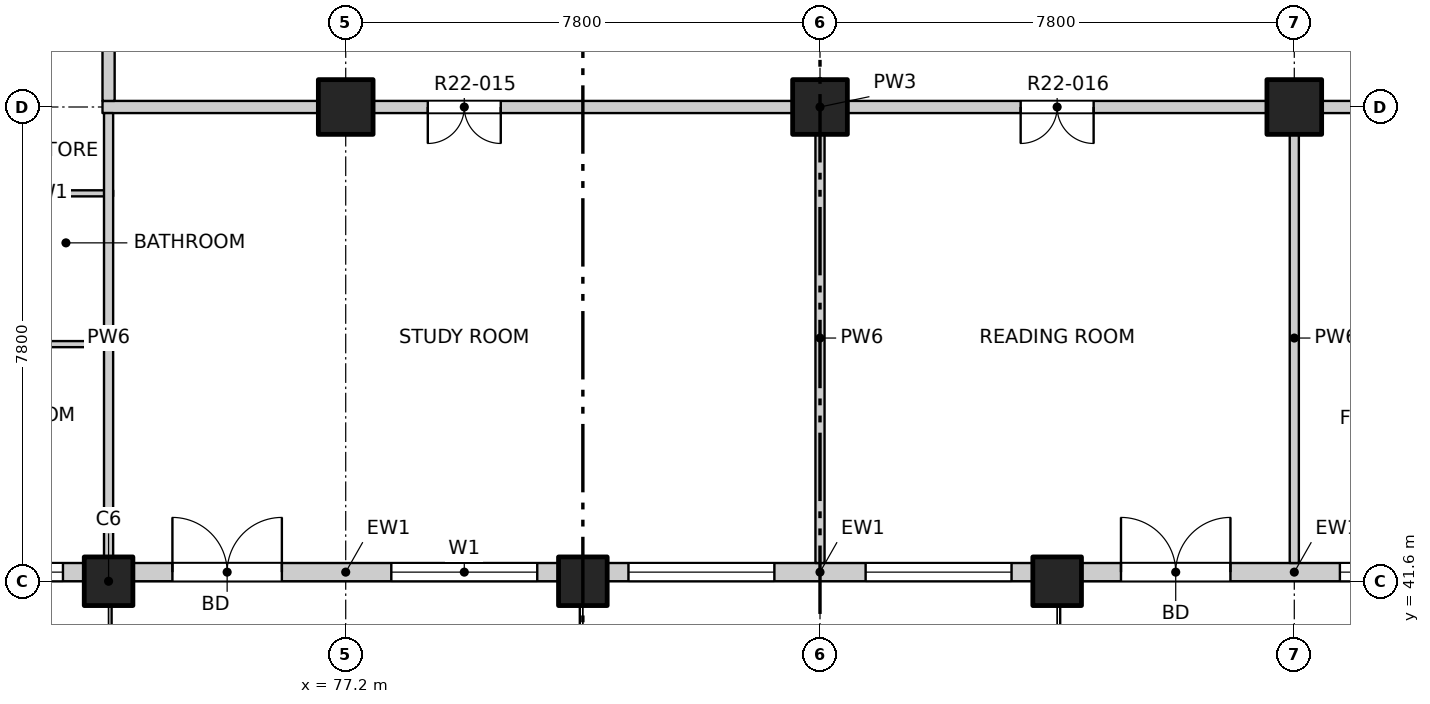
"""IFC4 building model, lengths in metres.
Left out: names, types, materials, properties, quantities, classifications, styles, units other than length and angle.
Written with IfcOpenShell. Run it as: python <this file> out.ifc"""

import sys

from ifc_helpers import new_model, si_unit, direction, frame, frame_2d, origin, origin_2d, place, context, subcontext, project, spatial, rectangle, extrude, element, fill, save


model = new_model("IFC4")
c1 = context("Model", 3, precision=1e-05, world=origin(), true_north=direction((0.0, 1.0)))
c2 = subcontext(c1, "Body", "Model", "MODEL_VIEW")
j1 = project(units=[si_unit("LENGTHUNIT", "METRE"), si_unit("PLANEANGLEUNIT", "RADIAN")], contexts=[c1])
p1 = place(None, origin())
s1 = spatial("IfcSite", under=j1, at=p1, CompositionType="ELEMENT")
p2 = place(p1, origin())
s2 = spatial("IfcBuilding", under=s1, at=p2, CompositionType="ELEMENT")
p3 = place(p2, frame((0.0, 0.0, 224.5)))
s3 = spatial("IfcBuildingStorey", under=s2, at=p3, CompositionType="ELEMENT", Elevation=224.5)
for number, where, z_axis, x_axis in (
    (1, (73.3, 41.6, -0.25), (0.0, 0.0, 1.0), (1.0, 0.0, 0.0)),
    (2, (81.1, 41.6, -0.25), (0.0, 0.0, 1.0), (1.0, 0.0, 0.0)),
    (3, (88.9, 41.6, -0.25), (0.0, 0.0, 1.0), (1.0, 0.0, 0.0)),
):
    element("IfcColumn", number, at=place(p3, frame(where, z_axis=z_axis, x_axis=x_axis)), inside=s3, PredefinedType="COLUMN", context=c2, shape_type="SweptSolid", body=[
        extrude(rectangle(XDim=0.8, YDim=0.8, at=origin_2d()), origin(), (0.0, 0.0, 1.0), 3.4),
    ])
for number, where, z_axis, x_axis in (
    (4, (77.2, 49.4, -0.25), (0.0, 0.0, 1.0), (1.0, 0.0, 0.0)),
    (5, (85.0, 49.4, -0.25), (0.0, 0.0, 1.0), (1.0, 0.0, 0.0)),
    (6, (92.8, 49.4, -0.25), (0.0, 0.0, 1.0), (1.0, 0.0, 0.0)),
):
    element("IfcColumn", number, at=place(p3, frame(where, z_axis=z_axis, x_axis=x_axis)), inside=s3, PredefinedType="COLUMN", context=c2, shape_type="SweptSolid", body=[
        extrude(rectangle(XDim=0.9, YDim=0.9, at=origin_2d()), origin(), (0.0, 0.0, 1.0), 3.4),
    ])
p4 = place(p3, frame((65.5, 41.75, 0.0), z_axis=(0.0, 0.0, 1.0), x_axis=(1.0, 0.0, 0.0)))
e7 = element("IfcWall", 7, at=p4, inside=s3, PredefinedType="SOLIDWALL", context=c2, shape_type="SweptSolid", body=[
    extrude(rectangle(XDim=7.4, YDim=0.3, at=frame_2d((3.7, 0.0))), origin(), (0.0, 0.0, 1.0), 2.7),
])
p5 = place(p4, frame((0.75, 0.0, 0.9)))
e8 = element("IfcOpeningElement", 8, at=p5, cuts=e7, PredefinedType="OPENING", context=c2, shape_type="SweptSolid", body=[
    extrude(rectangle(XDim=2.4, YDim=1.8, at=frame_2d((1.2, 0.9))), frame((0.0, 0.16, 0.0), z_axis=(0.0, -1.0, 0.0), x_axis=(1.0, 0.0, 0.0)), (0.0, 0.0, 1.0), 0.32),
])
p6 = place(p4, frame((4.65, 0.0, 0.9)))
e9 = element("IfcOpeningElement", 9, at=p6, cuts=e7, PredefinedType="OPENING", context=c2, shape_type="SweptSolid", body=[
    extrude(rectangle(XDim=2.4, YDim=1.8, at=frame_2d((1.2, 0.9))), frame((0.0, 0.16, 0.0), z_axis=(0.0, -1.0, 0.0), x_axis=(1.0, 0.0, 0.0)), (0.0, 0.0, 1.0), 0.32),
])
p7 = place(p3, frame((73.7, 41.75, 0.0), z_axis=(0.0, 0.0, 1.0), x_axis=(1.0, 0.0, 0.0)))
e10 = element("IfcWall", 10, at=p7, inside=s3, PredefinedType="SOLIDWALL", context=c2, shape_type="SweptSolid", body=[
    extrude(rectangle(XDim=7.0, YDim=0.3, at=frame_2d((3.5, 0.0))), origin(), (0.0, 0.0, 1.0), 2.7),
])
p8 = place(p7, frame((0.65, 0.0, 0.0)))
e11 = element("IfcOpeningElement", 11, at=p8, cuts=e10, PredefinedType="OPENING", context=c2, shape_type="SweptSolid", body=[
    extrude(rectangle(XDim=1.8, YDim=2.4, at=frame_2d((0.9, 1.2))), frame((0.0, 0.16, 0.0), z_axis=(0.0, -1.0, 0.0), x_axis=(1.0, 0.0, 0.0)), (0.0, 0.0, 1.0), 0.32),
])
p9 = place(p7, frame((4.25, 0.0, 0.9)))
e12 = element("IfcOpeningElement", 12, at=p9, cuts=e10, PredefinedType="OPENING", context=c2, shape_type="SweptSolid", body=[
    extrude(rectangle(XDim=2.4, YDim=1.8, at=frame_2d((1.2, 0.9))), frame((0.0, 0.16, 0.0), z_axis=(0.0, -1.0, 0.0), x_axis=(1.0, 0.0, 0.0)), (0.0, 0.0, 1.0), 0.32),
])
p10 = place(p3, frame((81.5, 41.75, 0.0), z_axis=(0.0, 0.0, 1.0), x_axis=(1.0, 0.0, 0.0)))
e13 = element("IfcWall", 13, at=p10, inside=s3, PredefinedType="SOLIDWALL", context=c2, shape_type="SweptSolid", body=[
    extrude(rectangle(XDim=7.0, YDim=0.3, at=frame_2d((3.5, 0.0))), origin(), (0.0, 0.0, 1.0), 2.7),
])
p11 = place(p10, frame((0.35, 0.0, 0.9)))
e14 = element("IfcOpeningElement", 14, at=p11, cuts=e13, PredefinedType="OPENING", context=c2, shape_type="SweptSolid", body=[
    extrude(rectangle(XDim=2.4, YDim=1.8, at=frame_2d((1.2, 0.9))), frame((0.0, 0.16, 0.0), z_axis=(0.0, -1.0, 0.0), x_axis=(1.0, 0.0, 0.0)), (0.0, 0.0, 1.0), 0.32),
])
p12 = place(p10, frame((4.25, 0.0, 0.9)))
e15 = element("IfcOpeningElement", 15, at=p12, cuts=e13, PredefinedType="OPENING", context=c2, shape_type="SweptSolid", body=[
    extrude(rectangle(XDim=2.4, YDim=1.8, at=frame_2d((1.2, 0.9))), frame((0.0, 0.16, 0.0), z_axis=(0.0, -1.0, 0.0), x_axis=(1.0, 0.0, 0.0)), (0.0, 0.0, 1.0), 0.32),
])
p13 = place(p3, frame((89.3, 41.75, 0.0), z_axis=(0.0, 0.0, 1.0), x_axis=(1.0, 0.0, 0.0)))
e16 = element("IfcWall", 16, at=p13, inside=s3, PredefinedType="SOLIDWALL", context=c2, shape_type="SweptSolid", body=[
    extrude(rectangle(XDim=7.0, YDim=0.3, at=frame_2d((3.5, 0.0))), origin(), (0.0, 0.0, 1.0), 2.7),
])
p14 = place(p13, frame((0.65, 0.0, 0.0)))
e17 = element("IfcOpeningElement", 17, at=p14, cuts=e16, PredefinedType="OPENING", context=c2, shape_type="SweptSolid", body=[
    extrude(rectangle(XDim=1.8, YDim=2.4, at=frame_2d((0.9, 1.2))), frame((0.0, 0.16, 0.0), z_axis=(0.0, -1.0, 0.0), x_axis=(1.0, 0.0, 0.0)), (0.0, 0.0, 1.0), 0.32),
])
p15 = place(p13, frame((4.25, 0.0, 0.9)))
e18 = element("IfcOpeningElement", 18, at=p15, cuts=e16, PredefinedType="OPENING", context=c2, shape_type="SweptSolid", body=[
    extrude(rectangle(XDim=2.4, YDim=1.8, at=frame_2d((1.2, 0.9))), frame((0.0, 0.16, 0.0), z_axis=(0.0, -1.0, 0.0), x_axis=(1.0, 0.0, 0.0)), (0.0, 0.0, 1.0), 0.32),
])
p16 = place(p3, frame((61.9, 45.5, 0.0), z_axis=(0.0, 0.0, 1.0), x_axis=(1.0, 0.0, 0.0)))
e19 = element("IfcWall", 19, at=p16, inside=s3, PredefinedType="PARTITIONING", context=c2, shape_type="SweptSolid", body=[
    extrude(rectangle(XDim=11.475, YDim=0.1, at=frame_2d((5.737, 0.0))), origin(), (0.0, 0.0, 1.0), 3.15),
])
p17 = place(p16, frame((7.965, 0.0, 0.0)))
e20 = element("IfcOpeningElement", 20, at=p17, cuts=e19, PredefinedType="OPENING", context=c2, shape_type="SweptSolid", body=[
    extrude(rectangle(XDim=0.9, YDim=2.1, at=frame_2d((0.45, 1.05))), frame((0.0, 0.06, 0.0), z_axis=(0.0, -1.0, 0.0), x_axis=(1.0, 0.0, 0.0)), (0.0, 0.0, 1.0), 0.12),
])
p18 = place(p3, frame((71.18, 47.98, 0.0), z_axis=(0.0, 0.0, 1.0), x_axis=(1.0, 0.0, 0.0)))
e21 = element("IfcWall", 21, at=p18, inside=s3, PredefinedType="PARTITIONING", context=c2, shape_type="SweptSolid", body=[
    extrude(rectangle(XDim=2.195, YDim=0.1, at=frame_2d((1.097, 0.0))), origin(), (0.0, 0.0, 1.0), 3.15),
])
p19 = place(p3, frame((73.2, 49.4, 0.0), z_axis=(0.0, 0.0, 1.0), x_axis=(1.0, 0.0, 0.0)))
e22 = element("IfcWall", 22, at=p19, inside=s3, PredefinedType="PARTITIONING", context=c2, shape_type="SweptSolid", body=[
    extrude(rectangle(XDim=23.6, YDim=0.2, at=frame_2d((11.8, 0.0))), origin(), (0.0, 0.0, 1.0), 3.15),
])
p20 = place(p19, frame((5.35, 0.0, 0.0)))
e23 = element("IfcOpeningElement", 23, at=p20, cuts=e22, PredefinedType="OPENING", context=c2, shape_type="SweptSolid", body=[
    extrude(rectangle(XDim=1.2, YDim=2.1, at=frame_2d((0.6, 1.05))), frame((0.0, 0.11, 0.0), z_axis=(0.0, -1.0, 0.0), x_axis=(1.0, 0.0, 0.0)), (0.0, 0.0, 1.0), 0.22),
])
p21 = place(p19, frame((15.1, 0.0, 0.0)))
e24 = element("IfcOpeningElement", 24, at=p21, cuts=e22, PredefinedType="OPENING", context=c2, shape_type="SweptSolid", body=[
    extrude(rectangle(XDim=1.2, YDim=2.1, at=frame_2d((0.6, 1.05))), frame((0.0, 0.11, 0.0), z_axis=(0.0, -1.0, 0.0), x_axis=(1.0, 0.0, 0.0)), (0.0, 0.0, 1.0), 0.22),
])
p22 = place(p19, frame((21.1, 0.0, 0.0)))
e25 = element("IfcOpeningElement", 25, at=p22, cuts=e22, PredefinedType="OPENING", context=c2, shape_type="SweptSolid", body=[
    extrude(rectangle(XDim=0.9, YDim=2.1, at=frame_2d((0.45, 1.05))), frame((0.0, 0.11, 0.0), z_axis=(0.0, -1.0, 0.0), x_axis=(1.0, 0.0, 0.0)), (0.0, 0.0, 1.0), 0.22),
])
p23 = place(p3, frame((73.3, 41.9, 0.0), z_axis=(0.0, 0.0, 1.0), x_axis=(0.0, 1.0, 0.0)))
e26 = element("IfcWall", 26, at=p23, inside=s3, PredefinedType="PARTITIONING", context=c2, shape_type="SweptSolid", body=[
    extrude(rectangle(XDim=7.4, YDim=0.15, at=frame_2d((3.7, 0.0))), origin(), (0.0, 0.0, 1.0), 3.15),
])
p24 = place(p3, frame((73.3, 49.5, 0.0), z_axis=(0.0, 0.0, 1.0), x_axis=(0.0, 1.0, 0.0)))
e27 = element("IfcWall", 27, at=p24, inside=s3, PredefinedType="PARTITIONING", context=c2, shape_type="SweptSolid", body=[
    extrude(rectangle(XDim=34.9, YDim=0.2, at=frame_2d((17.45, 0.0))), origin(), (0.0, 0.0, 1.0), 3.15),
])
p25 = place(p24, frame((3.575, 0.0, 0.0)))
e28 = element("IfcOpeningElement", 28, at=p25, cuts=e27, PredefinedType="OPENING", context=c2, shape_type="SweptSolid", body=[
    extrude(rectangle(XDim=1.0, YDim=2.1, at=frame_2d((0.5, 1.05))), frame((0.0, 0.11, 0.0), z_axis=(0.0, -1.0, 0.0), x_axis=(1.0, 0.0, 0.0)), (0.0, 0.0, 1.0), 0.22),
])
p26 = place(p24, frame((18.075, 0.0, 0.0)))
e29 = element("IfcOpeningElement", 29, at=p26, cuts=e27, PredefinedType="OPENING", context=c2, shape_type="SweptSolid", body=[
    extrude(rectangle(XDim=1.0, YDim=2.1, at=frame_2d((0.5, 1.05))), frame((0.0, 0.11, 0.0), z_axis=(0.0, -1.0, 0.0), x_axis=(1.0, 0.0, 0.0)), (0.0, 0.0, 1.0), 0.22),
])
p27 = place(p24, frame((26.175, 0.0, 0.0)))
e30 = element("IfcOpeningElement", 30, at=p27, cuts=e27, PredefinedType="OPENING", context=c2, shape_type="SweptSolid", body=[
    extrude(rectangle(XDim=1.0, YDim=2.1, at=frame_2d((0.5, 1.05))), frame((0.0, 0.11, 0.0), z_axis=(0.0, -1.0, 0.0), x_axis=(1.0, 0.0, 0.0)), (0.0, 0.0, 1.0), 0.22),
])
for number, where, z_axis, x_axis in (
    (31, (85.0, 41.9, 0.0), (0.0, 0.0, 1.0), (0.0, 1.0, 0.0)),
    (32, (92.8, 41.9, 0.0), (0.0, 0.0, 1.0), (0.0, 1.0, 0.0)),
):
    element("IfcWall", number, at=place(p3, frame(where, z_axis=z_axis, x_axis=x_axis)), inside=s3, PredefinedType="PARTITIONING", context=c2, shape_type="SweptSolid", body=[
        extrude(rectangle(XDim=7.4, YDim=0.15, at=frame_2d((3.7, 0.0))), origin(), (0.0, 0.0, 1.0), 3.15),
    ])
p28 = place(p6, origin())
e33 = element("IfcWindow", 33, at=p28, inside=s3, PartitioningType="DOUBLE_PANEL_VERTICAL", PredefinedType="WINDOW", context=c2, shape_type="SweptSolid", body=[
    extrude(rectangle(XDim=2.4, YDim=1.8, at=frame_2d((1.2, 0.9))), frame((0.0, 0.03, 0.0), z_axis=(0.0, -1.0, 0.0), x_axis=(1.0, 0.0, 0.0)), (0.0, 0.0, 1.0), 0.06),
])
fill(e9, e33)
p29 = place(p8, origin())
e34 = element("IfcDoor", 34, at=p29, inside=s3, OperationType="DOUBLE_DOOR_SINGLE_SWING", PredefinedType="DOOR", context=c2, shape_type="SweptSolid", body=[
    extrude(rectangle(XDim=1.8, YDim=2.4, at=frame_2d((0.9, 1.2))), frame((0.0, 0.025, 0.0), z_axis=(0.0, -1.0, 0.0), x_axis=(1.0, 0.0, 0.0)), (0.0, 0.0, 1.0), 0.05),
])
fill(e11, e34)
p30 = place(p9, origin())
e35 = element("IfcWindow", 35, at=p30, inside=s3, PartitioningType="DOUBLE_PANEL_VERTICAL", PredefinedType="WINDOW", context=c2, shape_type="SweptSolid", body=[
    extrude(rectangle(XDim=2.4, YDim=1.8, at=frame_2d((1.2, 0.9))), frame((0.0, 0.03, 0.0), z_axis=(0.0, -1.0, 0.0), x_axis=(1.0, 0.0, 0.0)), (0.0, 0.0, 1.0), 0.06),
])
fill(e12, e35)
p31 = place(p11, origin())
e36 = element("IfcWindow", 36, at=p31, inside=s3, PartitioningType="DOUBLE_PANEL_VERTICAL", PredefinedType="WINDOW", context=c2, shape_type="SweptSolid", body=[
    extrude(rectangle(XDim=2.4, YDim=1.8, at=frame_2d((1.2, 0.9))), frame((0.0, 0.03, 0.0), z_axis=(0.0, -1.0, 0.0), x_axis=(1.0, 0.0, 0.0)), (0.0, 0.0, 1.0), 0.06),
])
fill(e14, e36)
p32 = place(p12, origin())
e37 = element("IfcWindow", 37, at=p32, inside=s3, PartitioningType="DOUBLE_PANEL_VERTICAL", PredefinedType="WINDOW", context=c2, shape_type="SweptSolid", body=[
    extrude(rectangle(XDim=2.4, YDim=1.8, at=frame_2d((1.2, 0.9))), frame((0.0, 0.03, 0.0), z_axis=(0.0, -1.0, 0.0), x_axis=(1.0, 0.0, 0.0)), (0.0, 0.0, 1.0), 0.06),
])
fill(e15, e37)
p33 = place(p14, origin())
e38 = element("IfcDoor", 38, at=p33, inside=s3, OperationType="DOUBLE_DOOR_SINGLE_SWING", PredefinedType="DOOR", context=c2, shape_type="SweptSolid", body=[
    extrude(rectangle(XDim=1.8, YDim=2.4, at=frame_2d((0.9, 1.2))), frame((0.0, 0.025, 0.0), z_axis=(0.0, -1.0, 0.0), x_axis=(1.0, 0.0, 0.0)), (0.0, 0.0, 1.0), 0.05),
])
fill(e17, e38)
p34 = place(p15, origin())
e39 = element("IfcWindow", 39, at=p34, inside=s3, PartitioningType="DOUBLE_PANEL_VERTICAL", PredefinedType="WINDOW", context=c2, shape_type="SweptSolid", body=[
    extrude(rectangle(XDim=2.4, YDim=1.8, at=frame_2d((1.2, 0.9))), frame((0.0, 0.03, 0.0), z_axis=(0.0, -1.0, 0.0), x_axis=(1.0, 0.0, 0.0)), (0.0, 0.0, 1.0), 0.06),
])
fill(e18, e39)
p35 = place(p20, origin())
e40 = element("IfcDoor", 40, at=p35, inside=s3, OperationType="DOUBLE_DOOR_SINGLE_SWING", PredefinedType="DOOR", context=c2, shape_type="SweptSolid", body=[
    extrude(rectangle(XDim=1.2, YDim=2.1, at=frame_2d((0.6, 1.05))), frame((0.0, 0.025, 0.0), z_axis=(0.0, -1.0, 0.0), x_axis=(1.0, 0.0, 0.0)), (0.0, 0.0, 1.0), 0.05),
])
fill(e23, e40)
p36 = place(p21, origin())
e41 = element("IfcDoor", 41, at=p36, inside=s3, OperationType="DOUBLE_DOOR_SINGLE_SWING", PredefinedType="DOOR", context=c2, shape_type="SweptSolid", body=[
    extrude(rectangle(XDim=1.2, YDim=2.1, at=frame_2d((0.6, 1.05))), frame((0.0, 0.025, 0.0), z_axis=(0.0, -1.0, 0.0), x_axis=(1.0, 0.0, 0.0)), (0.0, 0.0, 1.0), 0.05),
])
fill(e24, e41)
save(model, sys.argv[1])
